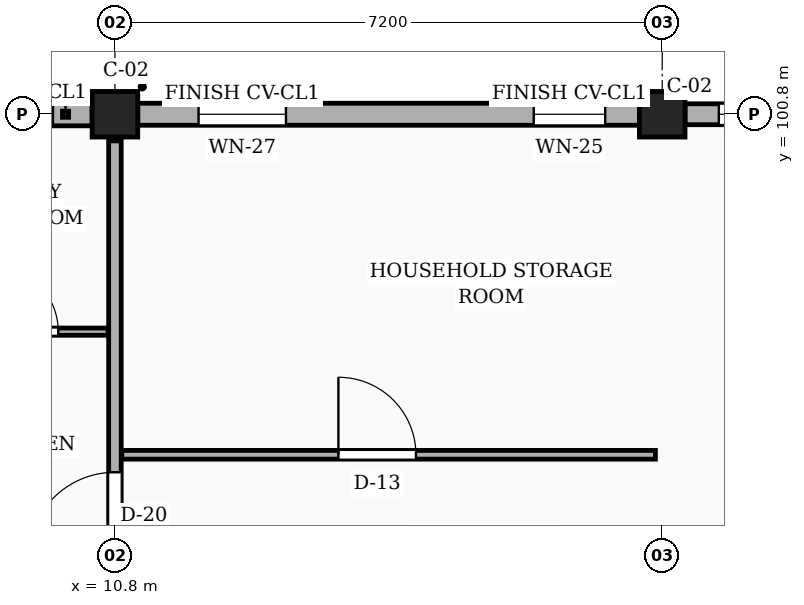
"""IFC4 building model, lengths in metres.
Left out: names, types, materials, properties, quantities, classifications, styles, units other than length and angle.
Written with IfcOpenShell. Run it as: python <this file> out.ifc"""

import sys

from ifc_helpers import new_model, si_unit, direction, frame, frame_2d, origin, origin_2d, place, context, subcontext, project, spatial, rectangle, extrude, element, fill, save


model = new_model("IFC4")
c1 = context("Model", 3, precision=1e-05, world=origin(), true_north=direction((0.0, 1.0)))
c2 = subcontext(c1, "Body", "Model", "MODEL_VIEW")
j1 = project(units=[si_unit("LENGTHUNIT", "METRE"), si_unit("PLANEANGLEUNIT", "RADIAN")], contexts=[c1])
p1 = place(None, origin())
s1 = spatial("IfcSite", under=j1, at=p1, CompositionType="ELEMENT")
p2 = place(p1, origin())
s2 = spatial("IfcBuilding", under=s1, at=p2, CompositionType="ELEMENT")
p3 = place(p2, frame((0.0, 0.0, 7.65)))
s3 = spatial("IfcBuildingStorey", under=s2, at=p3, CompositionType="ELEMENT", Elevation=7.65)
for number, where, z_axis, x_axis in (
    (1, (10.8, 100.8, 0.0), (0.0, 0.0, 1.0), (1.0, 0.0, 0.0)),
    (2, (18.0, 100.8, 0.0), (0.0, 0.0, 1.0), (1.0, 0.0, 0.0)),
):
    element("IfcColumn", number, at=place(p3, frame(where, z_axis=z_axis, x_axis=x_axis)), inside=s3, PredefinedType="COLUMN", context=c2, shape_type="SweptSolid", body=[
        extrude(rectangle(XDim=0.6, YDim=0.6, at=origin_2d()), origin(), (0.0, 0.0, 1.0), 3.15),
    ])
p4 = place(p3, frame((24.9, 100.8, 0.0), z_axis=(0.0, 0.0, 1.0), x_axis=(-1.0, 0.0, 0.0)))
e3 = element("IfcWall", 3, at=p4, inside=s3, PredefinedType="SOLIDWALL", context=c2, shape_type="SweptSolid", body=[
    extrude(rectangle(XDim=6.6, YDim=0.275, at=frame_2d((3.3, 0.0))), origin(), (0.0, 0.0, 1.0), 2.48),
])
p5 = place(p4, frame((0.81, 0.0, 0.78)))
e4 = element("IfcOpeningElement", 4, at=p5, cuts=e3, PredefinedType="OPENING", context=c2, shape_type="SweptSolid", body=[
    extrude(rectangle(XDim=1.3, YDim=1.36, at=frame_2d((0.65, 0.68))), frame((0.0, 0.147, 0.0), z_axis=(0.0, -1.0, 0.0), x_axis=(1.0, 0.0, 0.0)), (0.0, 0.0, 1.0), 0.295),
])
p6 = place(p4, frame((3.06, 0.0, 0.78)))
e5 = element("IfcOpeningElement", 5, at=p6, cuts=e3, PredefinedType="OPENING", context=c2, shape_type="SweptSolid", body=[
    extrude(rectangle(XDim=1.46, YDim=1.36, at=frame_2d((0.73, 0.68))), frame((0.0, 0.147, 0.0), z_axis=(0.0, -1.0, 0.0), x_axis=(1.0, 0.0, 0.0)), (0.0, 0.0, 1.0), 0.295),
])
p7 = place(p4, frame((5.105, 0.0, 0.78)))
e6 = element("IfcOpeningElement", 6, at=p7, cuts=e3, PredefinedType="OPENING", context=c2, shape_type="SweptSolid", body=[
    extrude(rectangle(XDim=1.05, YDim=1.44, at=frame_2d((0.525, 0.72))), frame((0.0, 0.147, 0.0), z_axis=(0.0, -1.0, 0.0), x_axis=(1.0, 0.0, 0.0)), (0.0, 0.0, 1.0), 0.295),
])
p8 = place(p3, frame((17.7, 100.8, 0.0), z_axis=(0.0, 0.0, 1.0), x_axis=(-1.0, 0.0, 0.0)))
e7 = element("IfcWall", 7, at=p8, inside=s3, PredefinedType="SOLIDWALL", context=c2, shape_type="SweptSolid", body=[
    extrude(rectangle(XDim=6.6, YDim=0.29, at=frame_2d((3.3, 0.0))), origin(), (0.0, 0.0, 1.0), 2.48),
])
p9 = place(p8, frame((0.45, 0.0, 0.78)))
e8 = element("IfcOpeningElement", 8, at=p9, cuts=e7, PredefinedType="OPENING", context=c2, shape_type="SweptSolid", body=[
    extrude(rectangle(XDim=0.94, YDim=1.44, at=frame_2d((0.47, 0.72))), frame((0.0, 0.155, 0.0), z_axis=(0.0, -1.0, 0.0), x_axis=(1.0, 0.0, 0.0)), (0.0, 0.0, 1.0), 0.31),
])
p10 = place(p8, frame((4.65, 0.0, 0.78)))
e9 = element("IfcOpeningElement", 9, at=p10, cuts=e7, PredefinedType="OPENING", context=c2, shape_type="SweptSolid", body=[
    extrude(rectangle(XDim=1.15, YDim=1.44, at=frame_2d((0.575, 0.72))), frame((0.0, 0.155, 0.0), z_axis=(0.0, -1.0, 0.0), x_axis=(1.0, 0.0, 0.0)), (0.0, 0.0, 1.0), 0.31),
])
p11 = place(p3, frame((10.5, 100.8, 0.0), z_axis=(0.0, 0.0, 1.0), x_axis=(-1.0, 0.0, 0.0)))
e10 = element("IfcWall", 10, at=p11, inside=s3, PredefinedType="SOLIDWALL", context=c2, shape_type="SweptSolid", body=[
    extrude(rectangle(XDim=6.6, YDim=0.305, at=frame_2d((3.3, 0.0))), origin(), (0.0, 0.0, 1.0), 2.48),
])
p12 = place(p11, frame((0.515, 0.0, 0.78)))
e11 = element("IfcOpeningElement", 11, at=p12, cuts=e10, PredefinedType="OPENING", context=c2, shape_type="SweptSolid", body=[
    extrude(rectangle(XDim=1.15, YDim=1.44, at=frame_2d((0.575, 0.72))), frame((0.0, 0.163, 0.0), z_axis=(0.0, -1.0, 0.0), x_axis=(1.0, 0.0, 0.0)), (0.0, 0.0, 1.0), 0.325),
])
p13 = place(p11, frame((3.575, 0.0, 0.78)))
e12 = element("IfcOpeningElement", 12, at=p13, cuts=e10, PredefinedType="OPENING", context=c2, shape_type="SweptSolid", body=[
    extrude(rectangle(XDim=1.35, YDim=1.44, at=frame_2d((0.675, 0.72))), frame((0.0, 0.163, 0.0), z_axis=(0.0, -1.0, 0.0), x_axis=(1.0, 0.0, 0.0)), (0.0, 0.0, 1.0), 0.325),
])
p14 = place(p3, frame((10.8, 93.95, 0.0), z_axis=(0.0, 0.0, 1.0), x_axis=(0.0, 1.0, 0.0)))
e13 = element("IfcWall", 13, at=p14, inside=s3, PredefinedType="PARTITIONING", context=c2, shape_type="SweptSolid", body=[
    extrude(rectangle(XDim=6.5, YDim=0.165, at=frame_2d((3.25, 0.0))), origin(), (0.0, 0.0, 1.0), 2.26),
])
p15 = place(p14, frame((1.0, 0.0, 0.0)))
e14 = element("IfcOpeningElement", 14, at=p15, cuts=e13, PredefinedType="OPENING", context=c2, shape_type="SweptSolid", body=[
    extrude(rectangle(XDim=1.14, YDim=2.18, at=frame_2d((0.57, 1.09))), frame((0.0, 0.093, 0.0), z_axis=(0.0, -1.0, 0.0), x_axis=(1.0, 0.0, 0.0)), (0.0, 0.0, 1.0), 0.185),
])
p16 = place(p3, frame((10.89, 96.32, 0.0), z_axis=(0.0, 0.0, 1.0), x_axis=(1.0, 0.0, 0.0)))
e15 = element("IfcWall", 15, at=p16, inside=s3, PredefinedType="PARTITIONING", context=c2, shape_type="SweptSolid", body=[
    extrude(rectangle(XDim=7.02, YDim=0.115, at=frame_2d((3.51, 0.0))), origin(), (0.0, 0.0, 1.0), 2.345),
])
p17 = place(p16, frame((2.85, 0.0, 0.0)))
e16 = element("IfcOpeningElement", 16, at=p17, cuts=e15, PredefinedType="OPENING", context=c2, shape_type="SweptSolid", body=[
    extrude(rectangle(XDim=1.02, YDim=2.15, at=frame_2d((0.51, 1.075))), frame((0.0, 0.067, 0.0), z_axis=(0.0, -1.0, 0.0), x_axis=(1.0, 0.0, 0.0)), (0.0, 0.0, 1.0), 0.135),
])
p18 = place(p3, frame((8.53, 97.94, 0.0), z_axis=(0.0, 0.0, 1.0), x_axis=(1.0, 0.0, 0.0)))
e17 = element("IfcWall", 17, at=p18, inside=s3, PredefinedType="PARTITIONING", context=c2, shape_type="SweptSolid", body=[
    extrude(rectangle(XDim=2.18, YDim=0.095, at=frame_2d((1.09, 0.0))), origin(), (0.0, 0.0, 1.0), 2.345),
])
p19 = place(p18, frame((0.655, 0.0, 0.0)))
e18 = element("IfcOpeningElement", 18, at=p19, cuts=e17, PredefinedType="OPENING", context=c2, shape_type="SweptSolid", body=[
    extrude(rectangle(XDim=0.87, YDim=2.05, at=frame_2d((0.435, 1.025))), frame((0.0, 0.058, 0.0), z_axis=(0.0, -1.0, 0.0), x_axis=(1.0, 0.0, 0.0)), (0.0, 0.0, 1.0), 0.115),
])
p20 = place(p7, origin())
e19 = element("IfcWindow", 19, at=p20, inside=s3, PartitioningType="SINGLE_PANEL", PredefinedType="WINDOW", context=c2, shape_type="SweptSolid", body=[
    extrude(rectangle(XDim=1.05, YDim=1.44, at=frame_2d((0.525, 0.72))), frame((0.0, 0.03, 0.0), z_axis=(0.0, -1.0, 0.0), x_axis=(1.0, 0.0, 0.0)), (0.0, 0.0, 1.0), 0.06),
])
fill(e6, e19)
p21 = place(p9, origin())
e20 = element("IfcWindow", 20, at=p21, inside=s3, PartitioningType="SINGLE_PANEL", PredefinedType="WINDOW", context=c2, shape_type="SweptSolid", body=[
    extrude(rectangle(XDim=0.94, YDim=1.44, at=frame_2d((0.47, 0.72))), frame((0.0, 0.03, 0.0), z_axis=(0.0, -1.0, 0.0), x_axis=(1.0, 0.0, 0.0)), (0.0, 0.0, 1.0), 0.06),
])
fill(e8, e20)
p22 = place(p10, origin())
e21 = element("IfcWindow", 21, at=p22, inside=s3, PartitioningType="SINGLE_PANEL", PredefinedType="WINDOW", context=c2, shape_type="SweptSolid", body=[
    extrude(rectangle(XDim=1.15, YDim=1.44, at=frame_2d((0.575, 0.72))), frame((0.0, 0.03, 0.0), z_axis=(0.0, -1.0, 0.0), x_axis=(1.0, 0.0, 0.0)), (0.0, 0.0, 1.0), 0.06),
])
fill(e9, e21)
p23 = place(p12, origin())
e22 = element("IfcWindow", 22, at=p23, inside=s3, PartitioningType="SINGLE_PANEL", PredefinedType="WINDOW", context=c2, shape_type="SweptSolid", body=[
    extrude(rectangle(XDim=1.15, YDim=1.44, at=frame_2d((0.575, 0.72))), frame((0.0, 0.03, 0.0), z_axis=(0.0, -1.0, 0.0), x_axis=(1.0, 0.0, 0.0)), (0.0, 0.0, 1.0), 0.06),
])
fill(e11, e22)
p24 = place(p15, origin())
e23 = element("IfcDoor", 23, at=p24, inside=s3, OperationType="SINGLE_SWING_LEFT", PredefinedType="DOOR", context=c2, shape_type="SweptSolid", body=[
    extrude(rectangle(XDim=1.14, YDim=2.18, at=frame_2d((0.57, 1.09))), frame((0.0, 0.025, 0.0), z_axis=(0.0, -1.0, 0.0), x_axis=(1.0, 0.0, 0.0)), (0.0, 0.0, 1.0), 0.05),
])
fill(e14, e23)
p25 = place(p17, origin())
e24 = element("IfcDoor", 24, at=p25, inside=s3, OperationType="SINGLE_SWING_LEFT", PredefinedType="DOOR", context=c2, shape_type="SweptSolid", body=[
    extrude(rectangle(XDim=1.02, YDim=2.15, at=frame_2d((0.51, 1.075))), frame((0.0, 0.025, 0.0), z_axis=(0.0, -1.0, 0.0), x_axis=(1.0, 0.0, 0.0)), (0.0, 0.0, 1.0), 0.05),
])
fill(e16, e24)
p26 = place(p19, origin())
e25 = element("IfcDoor", 25, at=p26, inside=s3, OperationType="SINGLE_SWING_LEFT", PredefinedType="DOOR", context=c2, shape_type="SweptSolid", body=[
    extrude(rectangle(XDim=0.87, YDim=2.05, at=frame_2d((0.435, 1.025))), frame((0.0, 0.025, 0.0), z_axis=(0.0, -1.0, 0.0), x_axis=(1.0, 0.0, 0.0)), (0.0, 0.0, 1.0), 0.05),
])
fill(e18, e25)
save(model, sys.argv[1])
